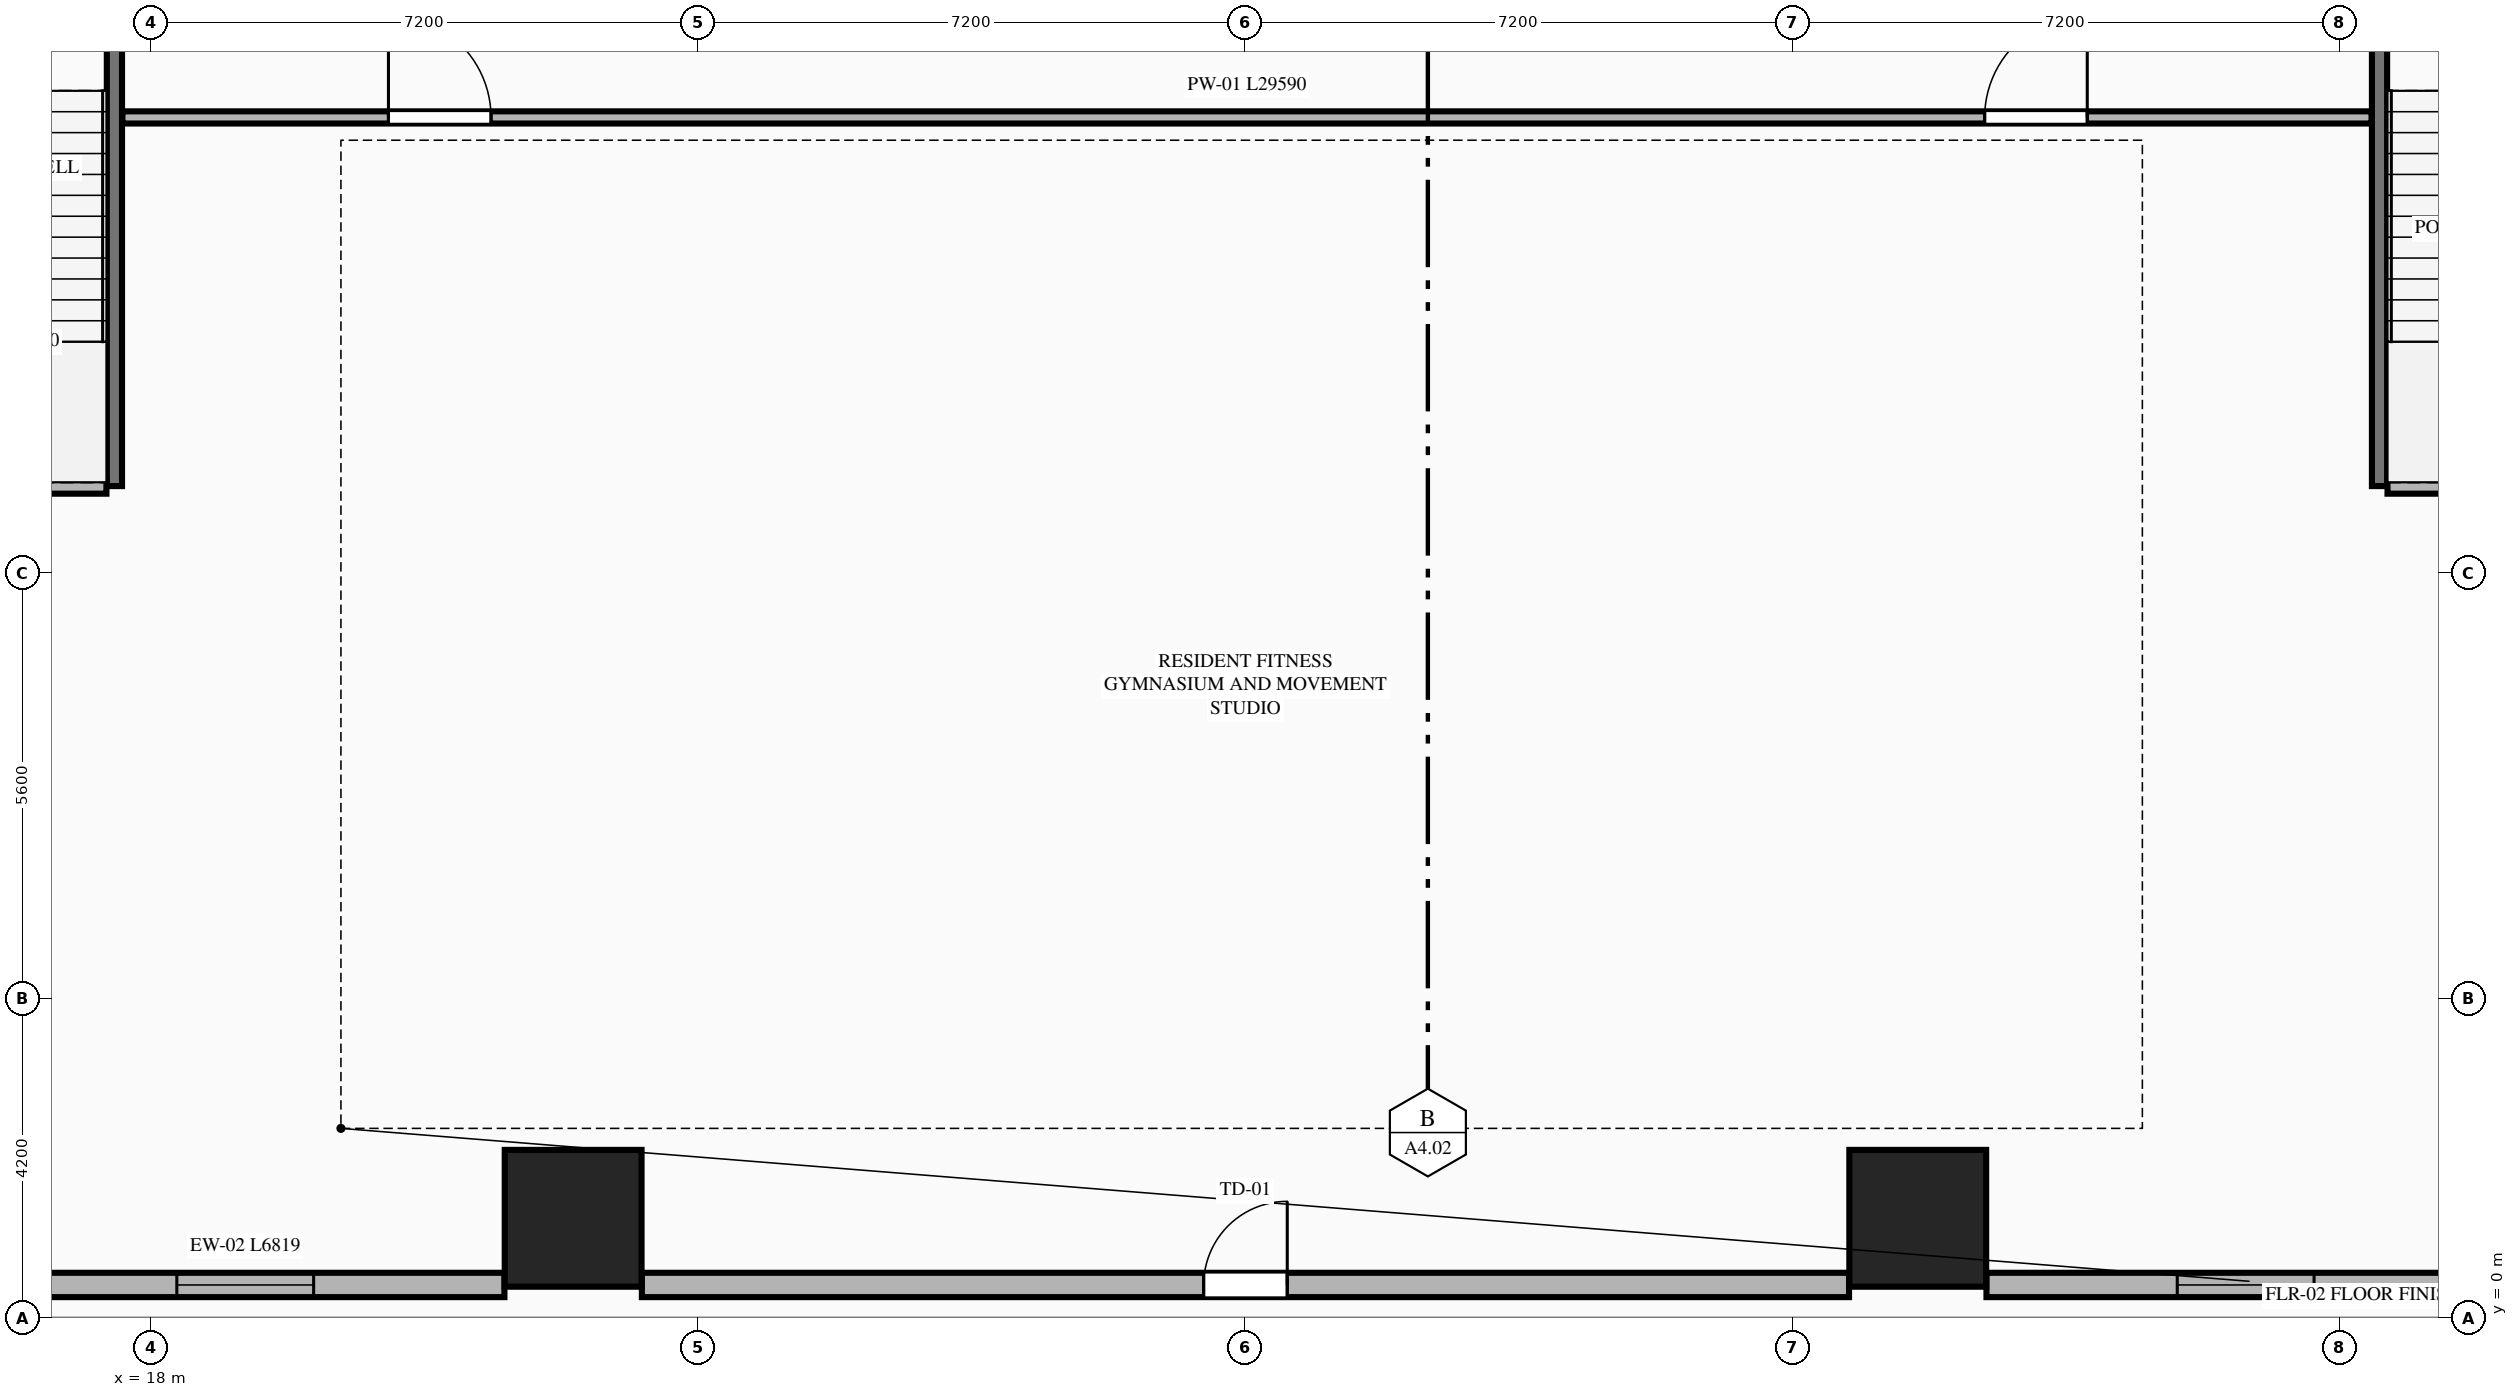
"""IFC4 building model, lengths in metres.
Left out: names, types, materials, properties, quantities, classifications, styles, units other than length and angle.
Written with IfcOpenShell. Run it as: python <this file> out.ifc"""

import sys

from ifc_helpers import new_model, si_unit, direction, frame, frame_2d, origin, origin_2d, place, context, subcontext, project, spatial, rectangle, extrude, element, fill, save


model = new_model("IFC4")
c1 = context("Model", 3, precision=1e-05, world=origin(), true_north=direction((0.0, 1.0)))
c2 = subcontext(c1, "Body", "Model", "MODEL_VIEW")
j1 = project(units=[si_unit("LENGTHUNIT", "METRE"), si_unit("PLANEANGLEUNIT", "RADIAN")], contexts=[c1])
p1 = place(None, origin())
s1 = spatial("IfcSite", under=j1, at=p1, CompositionType="ELEMENT")
p2 = place(p1, origin())
s2 = spatial("IfcBuilding", under=s1, at=p2, CompositionType="ELEMENT")
p3 = place(p2, frame((0.0, 0.0, 15.0)))
s3 = spatial("IfcBuildingStorey", under=s2, at=p3, CompositionType="ELEMENT", Elevation=15.0)
for number, where, z_axis, x_axis in (
    (1, (23.555, 1.317, 0.0), (0.0, 0.0, 1.0), (1.0, 0.0, 0.0)),
    (2, (41.245, 1.317, 0.0), (0.0, 0.0, 1.0), (1.0, 0.0, 0.0)),
):
    element("IfcColumn", number, at=place(p3, frame(where, z_axis=z_axis, x_axis=x_axis)), inside=s3, PredefinedType="COLUMN", context=c2, shape_type="SweptSolid", body=[
        extrude(rectangle(XDim=1.8, YDim=1.8, at=origin_2d()), origin(), (0.0, 0.0, 1.0), 4.5),
    ])
p4 = place(p3, frame((17.52, 10.95, 0.0), z_axis=(0.0, 0.0, 1.0), x_axis=(0.0, 1.0, 0.0)))
e3 = element("IfcWall", 3, at=p4, inside=s3, PredefinedType="SHEAR", context=c2, shape_type="SweptSolid", body=[
    extrude(rectangle(XDim=6.85, YDim=0.2, at=frame_2d((3.425, 0.0))), origin(), (0.0, 0.0, 1.0), 4.5),
])
p5 = place(p3, frame((14.225, 10.95, 0.0), z_axis=(0.0, 0.0, 1.0), x_axis=(1.0, 0.0, 0.0)))
e4 = element("IfcWall", 4, at=p5, inside=s3, PredefinedType="PLUMBINGWALL", context=c2, shape_type="SweptSolid", body=[
    extrude(rectangle(XDim=3.19, YDim=0.2, at=frame_2d((1.595, 0.0))), origin(), (0.0, 0.0, 1.0), 4.22),
])
p6 = place(p3, frame((47.32, 10.95, 0.0), z_axis=(0.0, 0.0, 1.0), x_axis=(0.0, 1.0, 0.0)))
e5 = element("IfcWall", 5, at=p6, inside=s3, PredefinedType="SHEAR", context=c2, shape_type="SweptSolid", body=[
    extrude(rectangle(XDim=6.85, YDim=0.2, at=frame_2d((3.425, 0.0))), origin(), (0.0, 0.0, 1.0), 4.5),
])
p7 = place(p3, frame((47.425, 10.95, 0.0), z_axis=(0.0, 0.0, 1.0), x_axis=(1.0, 0.0, 0.0)))
e6 = element("IfcWall", 6, at=p7, inside=s3, PredefinedType="PLUMBINGWALL", context=c2, shape_type="SweptSolid", body=[
    extrude(rectangle(XDim=3.19, YDim=0.2, at=frame_2d((1.595, 0.0))), origin(), (0.0, 0.0, 1.0), 4.22),
])
p8 = place(p3, frame((17.625, 15.8, 0.0), z_axis=(0.0, 0.0, 1.0), x_axis=(1.0, 0.0, 0.0)))
e7 = element("IfcWall", 7, at=p8, inside=s3, PredefinedType="PARTITIONING", context=c2, shape_type="SweptSolid", body=[
    extrude(rectangle(XDim=29.59, YDim=0.16, at=frame_2d((14.795, 0.0))), origin(), (0.0, 0.0, 1.0), 4.22),
])
p9 = place(p8, frame((3.5, 0.0, 0.0)))
e8 = element("IfcOpeningElement", 8, at=p9, cuts=e7, PredefinedType="OPENING", context=c2, shape_type="SweptSolid", body=[
    extrude(rectangle(XDim=1.35, YDim=2.35, at=frame_2d((0.675, 1.175))), frame((0.0, 0.09, 0.0), z_axis=(0.0, -1.0, 0.0), x_axis=(1.0, 0.0, 0.0)), (0.0, 0.0, 1.0), 0.18),
])
p10 = place(p8, frame((24.5, 0.0, 0.0)))
e9 = element("IfcOpeningElement", 9, at=p10, cuts=e7, PredefinedType="OPENING", context=c2, shape_type="SweptSolid", body=[
    extrude(rectangle(XDim=1.35, YDim=2.35, at=frame_2d((0.675, 1.175))), frame((0.0, 0.09, 0.0), z_axis=(0.0, -1.0, 0.0), x_axis=(1.0, 0.0, 0.0)), (0.0, 0.0, 1.0), 0.18),
])
p11 = place(p3, frame((15.832, 0.44, 0.0), z_axis=(0.0, 0.0, 1.0), x_axis=(1.0, 0.0, 0.0)))
e10 = element("IfcWall", 10, at=p11, inside=s3, PredefinedType="STANDARD", context=c2, shape_type="SweptSolid", body=[
    extrude(rectangle(XDim=6.819, YDim=0.32, at=frame_2d((3.409, 0.0))), origin(), (0.0, 0.0, 1.0), 4.22),
])
p12 = place(p11, frame((2.509, 0.0, 0.75)))
e11 = element("IfcOpeningElement", 11, at=p12, cuts=e10, PredefinedType="OPENING", context=c2, shape_type="SweptSolid", body=[
    extrude(rectangle(XDim=1.8, YDim=2.4, at=frame_2d((0.9, 1.2))), frame((0.0, 0.17, 0.0), z_axis=(0.0, -1.0, 0.0), x_axis=(1.0, 0.0, 0.0)), (0.0, 0.0, 1.0), 0.34),
])
p13 = place(p3, frame((24.459, 0.44, 0.0), z_axis=(0.0, 0.0, 1.0), x_axis=(1.0, 0.0, 0.0)))
e12 = element("IfcWall", 12, at=p13, inside=s3, PredefinedType="STANDARD", context=c2, shape_type="SweptSolid", body=[
    extrude(rectangle(XDim=15.882, YDim=0.32, at=frame_2d((7.941, 0.0))), origin(), (0.0, 0.0, 1.0), 4.22),
])
p14 = place(p13, frame((7.391, 0.0, 0.0)))
e13 = element("IfcOpeningElement", 13, at=p14, cuts=e12, PredefinedType="OPENING", context=c2, shape_type="SweptSolid", body=[
    extrude(rectangle(XDim=1.1, YDim=2.25, at=frame_2d((0.55, 1.125))), frame((0.0, 0.17, 0.0), z_axis=(0.0, -1.0, 0.0), x_axis=(1.0, 0.0, 0.0)), (0.0, 0.0, 1.0), 0.34),
])
p15 = place(p3, frame((42.149, 0.44, 0.0), z_axis=(0.0, 0.0, 1.0), x_axis=(1.0, 0.0, 0.0)))
e14 = element("IfcWall", 14, at=p15, inside=s3, PredefinedType="STANDARD", context=c2, shape_type="SweptSolid", body=[
    extrude(rectangle(XDim=6.819, YDim=0.32, at=frame_2d((3.41, 0.0))), origin(), (0.0, 0.0, 1.0), 4.22),
])
p16 = place(p15, frame((2.51, 0.0, 0.75)))
e15 = element("IfcOpeningElement", 15, at=p16, cuts=e14, PredefinedType="OPENING", context=c2, shape_type="SweptSolid", body=[
    extrude(rectangle(XDim=1.8, YDim=2.4, at=frame_2d((0.9, 1.2))), frame((0.0, 0.17, 0.0), z_axis=(0.0, -1.0, 0.0), x_axis=(1.0, 0.0, 0.0)), (0.0, 0.0, 1.0), 0.34),
])
p17 = place(p9, origin())
e16 = element("IfcDoor", 16, at=p17, inside=s3, OperationType="SINGLE_SWING_LEFT", PredefinedType="DOOR", context=c2, shape_type="SweptSolid", body=[
    extrude(rectangle(XDim=1.35, YDim=2.35, at=frame_2d((0.675, 1.175))), frame((0.0, 0.025, 0.0), z_axis=(0.0, -1.0, 0.0), x_axis=(1.0, 0.0, 0.0)), (0.0, 0.0, 1.0), 0.05),
])
fill(e8, e16)
p18 = place(p10, origin())
e17 = element("IfcDoor", 17, at=p18, inside=s3, OperationType="SINGLE_SWING_RIGHT", PredefinedType="DOOR", context=c2, shape_type="SweptSolid", body=[
    extrude(rectangle(XDim=1.35, YDim=2.35, at=frame_2d((0.675, 1.175))), frame((0.0, 0.025, 0.0), z_axis=(0.0, -1.0, 0.0), x_axis=(1.0, 0.0, 0.0)), (0.0, 0.0, 1.0), 0.05),
])
fill(e9, e17)
p19 = place(p12, origin())
e18 = element("IfcWindow", 18, at=p19, inside=s3, PartitioningType="SINGLE_PANEL", PredefinedType="WINDOW", context=c2, shape_type="SweptSolid", body=[
    extrude(rectangle(XDim=1.8, YDim=2.4, at=frame_2d((0.9, 1.2))), frame((0.0, 0.03, 0.0), z_axis=(0.0, -1.0, 0.0), x_axis=(1.0, 0.0, 0.0)), (0.0, 0.0, 1.0), 0.06),
])
fill(e11, e18)
p20 = place(p14, origin())
e19 = element("IfcDoor", 19, at=p20, inside=s3, OperationType="SINGLE_SWING_RIGHT", PredefinedType="DOOR", context=c2, shape_type="SweptSolid", body=[
    extrude(rectangle(XDim=1.1, YDim=2.25, at=frame_2d((0.55, 1.125))), frame((0.0, 0.025, 0.0), z_axis=(0.0, -1.0, 0.0), x_axis=(1.0, 0.0, 0.0)), (0.0, 0.0, 1.0), 0.05),
])
fill(e13, e19)
p21 = place(p16, origin())
e20 = element("IfcWindow", 20, at=p21, inside=s3, PartitioningType="SINGLE_PANEL", PredefinedType="WINDOW", context=c2, shape_type="SweptSolid", body=[
    extrude(rectangle(XDim=1.8, YDim=2.4, at=frame_2d((0.9, 1.2))), frame((0.0, 0.03, 0.0), z_axis=(0.0, -1.0, 0.0), x_axis=(1.0, 0.0, 0.0)), (0.0, 0.0, 1.0), 0.06),
])
fill(e15, e20)
save(model, sys.argv[1])
